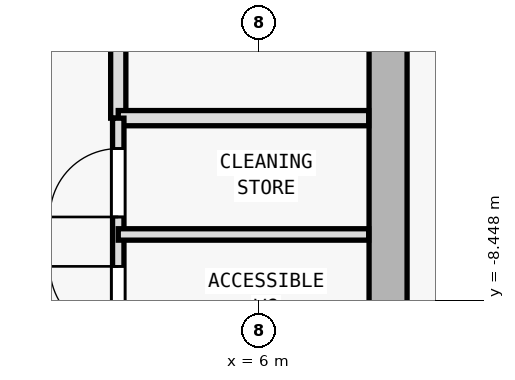
"""IFC4 building model, lengths in metres.
Left out: names, types, materials, properties, quantities, classifications, styles, units other than length and angle.
Written with IfcOpenShell. Run it as: python <this file> out.ifc"""

import sys

from ifc_helpers import new_model, si_unit, direction, frame, frame_2d, origin, place, context, subcontext, project, spatial, rectangle, extrude, element, fill, save


model = new_model("IFC4")
c1 = context("Model", 3, precision=1e-05, world=origin(), true_north=direction((0.0, 1.0)))
c2 = subcontext(c1, "Body", "Model", "MODEL_VIEW")
j1 = project(units=[si_unit("LENGTHUNIT", "METRE"), si_unit("PLANEANGLEUNIT", "RADIAN")], contexts=[c1])
p1 = place(None, origin())
s1 = spatial("IfcSite", under=j1, at=p1, CompositionType="ELEMENT")
p2 = place(p1, origin())
s2 = spatial("IfcBuilding", under=s1, at=p2, CompositionType="ELEMENT")
p3 = place(p2, frame((0.0, 0.0, 138.6)))
s3 = spatial("IfcBuildingStorey", under=s2, at=p3, CompositionType="ELEMENT", Elevation=138.6)
p4 = place(p3, frame((7.7, 9.95, 0.0), z_axis=(0.0, 0.0, 1.0), x_axis=(0.0, -1.0, 0.0)))
e1 = element("IfcWall", 1, at=p4, inside=s3, PredefinedType="SHEAR", context=c2, shape_type="SweptSolid", body=[
    extrude(rectangle(XDim=19.1, YDim=0.5, at=frame_2d((9.55, 0.0))), origin(), (0.0, 0.0, 1.0), 3.35),
])
p5 = place(p3, frame((4.15, -6.05, 0.0), z_axis=(0.0, 0.0, 1.0), x_axis=(0.0, 1.0, 0.0)))
e2 = element("IfcWall", 2, at=p5, inside=s3, PredefinedType="SOLIDWALL", context=c2, shape_type="SweptSolid", body=[
    extrude(rectangle(XDim=8.7, YDim=0.2, at=frame_2d((4.35, 0.0))), origin(), (0.0, 0.0, 1.0), 3.35),
])
p6 = place(p5, frame((3.6, 0.0, 0.0)))
e3 = element("IfcOpeningElement", 3, at=p6, cuts=e2, PredefinedType="OPENING", context=c2, shape_type="SweptSolid", body=[
    extrude(rectangle(XDim=0.95, YDim=2.1, at=frame_2d((0.475, 1.05))), frame((0.0, 0.11, 0.0), z_axis=(0.0, -1.0, 0.0), x_axis=(1.0, 0.0, 0.0)), (0.0, 0.0, 1.0), 0.22),
])
p7 = place(p3, frame((4.15, -6.05, 0.0), z_axis=(0.0, 0.0, 1.0), x_axis=(1.0, 0.0, 0.0)))
e4 = element("IfcWall", 4, at=p7, inside=s3, PredefinedType="SOLIDWALL", context=c2, shape_type="SweptSolid", body=[
    extrude(rectangle(XDim=3.295, YDim=0.2, at=frame_2d((1.647, 0.0))), origin(), (0.0, 0.0, 1.0), 3.35),
])
p8 = place(p3, frame((4.15, -9.145, 0.0), z_axis=(0.0, 0.0, 1.0), x_axis=(0.0, 1.0, 0.0)))
e5 = element("IfcWall", 5, at=p8, inside=s3, PredefinedType="PARTITIONING", context=c2, shape_type="SweptSolid", body=[
    extrude(rectangle(XDim=3.095, YDim=0.15, at=frame_2d((1.547, 0.0))), origin(), (0.0, 0.0, 1.0), 3.35),
])
p9 = place(p8, frame((0.245, 0.0, 0.0)))
e6 = element("IfcOpeningElement", 6, at=p9, cuts=e5, PredefinedType="OPENING", context=c2, shape_type="SweptSolid", body=[
    extrude(rectangle(XDim=0.9, YDim=2.1, at=frame_2d((0.45, 1.05))), frame((0.0, 0.085, 0.0), z_axis=(0.0, -1.0, 0.0), x_axis=(1.0, 0.0, 0.0)), (0.0, 0.0, 1.0), 0.17),
])
p10 = place(p8, frame((1.795, 0.0, 0.0)))
e7 = element("IfcOpeningElement", 7, at=p10, cuts=e5, PredefinedType="OPENING", context=c2, shape_type="SweptSolid", body=[
    extrude(rectangle(XDim=0.9, YDim=2.1, at=frame_2d((0.45, 1.05))), frame((0.0, 0.085, 0.0), z_axis=(0.0, -1.0, 0.0), x_axis=(1.0, 0.0, 0.0)), (0.0, 0.0, 1.0), 0.17),
])
p11 = place(p3, frame((4.15, -7.58, 0.0), z_axis=(0.0, 0.0, 1.0), x_axis=(1.0, 0.0, 0.0)))
e8 = element("IfcWall", 8, at=p11, inside=s3, PredefinedType="PARTITIONING", context=c2, shape_type="SweptSolid", body=[
    extrude(rectangle(XDim=3.295, YDim=0.15, at=frame_2d((1.647, 0.0))), origin(), (0.0, 0.0, 1.0), 3.35),
])
p12 = place(p9, origin())
e9 = element("IfcDoor", 9, at=p12, inside=s3, OperationType="SINGLE_SWING_RIGHT", PredefinedType="DOOR", context=c2, shape_type="SweptSolid", body=[
    extrude(rectangle(XDim=0.9, YDim=2.1, at=frame_2d((0.45, 1.05))), frame((0.0, 0.025, 0.0), z_axis=(0.0, -1.0, 0.0), x_axis=(1.0, 0.0, 0.0)), (0.0, 0.0, 1.0), 0.05),
])
fill(e6, e9)
p13 = place(p10, origin())
e10 = element("IfcDoor", 10, at=p13, inside=s3, OperationType="SINGLE_SWING_LEFT", PredefinedType="DOOR", context=c2, shape_type="SweptSolid", body=[
    extrude(rectangle(XDim=0.9, YDim=2.1, at=frame_2d((0.45, 1.05))), frame((0.0, 0.025, 0.0), z_axis=(0.0, -1.0, 0.0), x_axis=(1.0, 0.0, 0.0)), (0.0, 0.0, 1.0), 0.05),
])
fill(e7, e10)
save(model, sys.argv[1])
